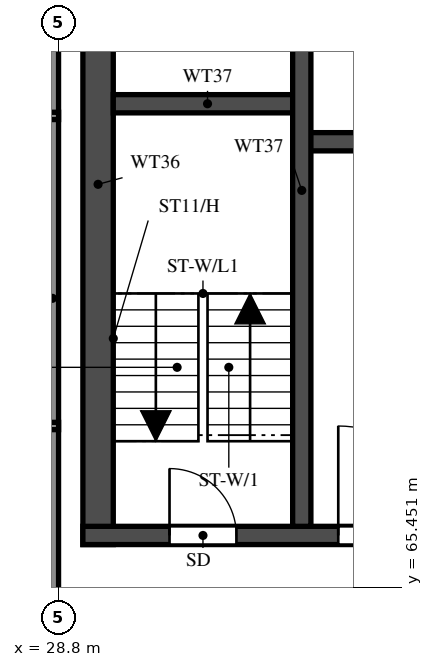
"""IFC4 building model, lengths in metres.
Left out: names, types, materials, properties, quantities, classifications, styles, units other than length and angle.
Written with IfcOpenShell. Run it as: python <this file> out.ifc"""

import sys

from ifc_helpers import new_model, si_unit, direction, frame, frame_2d, origin, place, context, subcontext, project, spatial, rectangle, extrude, element, fill, save


model = new_model("IFC4")
c1 = context("Model", 3, precision=1e-05, world=origin(), true_north=direction((0.0, 1.0)))
c2 = subcontext(c1, "Body", "Model", "MODEL_VIEW")
j1 = project(units=[si_unit("LENGTHUNIT", "METRE"), si_unit("PLANEANGLEUNIT", "RADIAN")], contexts=[c1])
p1 = place(None, origin())
s1 = spatial("IfcSite", under=j1, at=p1, CompositionType="ELEMENT")
p2 = place(p1, origin())
s2 = spatial("IfcBuilding", under=s1, at=p2, CompositionType="ELEMENT")
p3 = place(p2, frame((0.0, 0.0, 264.0)))
s3 = spatial("IfcBuildingStorey", under=s2, at=p3, CompositionType="ELEMENT", Elevation=264.0)
p4 = place(p3, frame((29.45, 66.15, 0.0), z_axis=(0.0, 0.0, 1.0), x_axis=(0.0, 1.0, 0.0)))
e1 = element("IfcWall", 1, at=p4, inside=s3, PredefinedType="SHEAR", context=c2, shape_type="SweptSolid", body=[
    extrude(rectangle(XDim=11.85, YDim=0.5, at=frame_2d((5.925, 0.0))), origin(), (0.0, 0.0, 1.0), 3.22),
])
p5 = place(p3, frame((29.2, 66.3, 0.0), z_axis=(0.0, 0.0, 1.0), x_axis=(1.0, 0.0, 0.0)))
e2 = element("IfcWall", 2, at=p5, inside=s3, PredefinedType="SHEAR", context=c2, shape_type="SweptSolid", body=[
    extrude(rectangle(XDim=42.4, YDim=0.3, at=frame_2d((21.2, 0.0))), origin(), (0.0, 0.0, 1.0), 3.22),
])
p6 = place(p5, frame((1.425, 0.0, 0.0)))
e3 = element("IfcOpeningElement", 3, at=p6, cuts=e2, PredefinedType="OPENING", context=c2, shape_type="SweptSolid", body=[
    extrude(rectangle(XDim=1.1, YDim=2.1, at=frame_2d((0.55, 1.05))), frame((0.0, 0.16, 0.0), z_axis=(0.0, -1.0, 0.0), x_axis=(1.0, 0.0, 0.0)), (0.0, 0.0, 1.0), 0.32),
])
p7 = place(p5, frame((4.2, 0.0, 0.0)))
e4 = element("IfcOpeningElement", 4, at=p7, cuts=e2, PredefinedType="OPENING", context=c2, shape_type="SweptSolid", body=[
    extrude(rectangle(XDim=1.8, YDim=2.1, at=frame_2d((0.9, 1.05))), frame((0.0, 0.16, 0.0), z_axis=(0.0, -1.0, 0.0), x_axis=(1.0, 0.0, 0.0)), (0.0, 0.0, 1.0), 0.32),
])
p8 = place(p3, frame((32.8, 72.775, 0.0), z_axis=(0.0, 0.0, 1.0), x_axis=(1.0, 0.0, 0.0)))
e5 = element("IfcWall", 5, at=p8, inside=s3, PredefinedType="SHEAR", context=c2, shape_type="SweptSolid", body=[
    extrude(rectangle(XDim=35.2, YDim=0.3, at=frame_2d((17.6, 0.0))), origin(), (0.0, 0.0, 1.0), 3.22),
])
p9 = place(p8, frame((19.8, 0.0, 0.0)))
e6 = element("IfcOpeningElement", 6, at=p9, cuts=e5, PredefinedType="OPENING", context=c2, shape_type="SweptSolid", body=[
    extrude(rectangle(XDim=1.1, YDim=2.1, at=frame_2d((0.55, 1.05))), frame((0.0, 0.16, 0.0), z_axis=(0.0, -1.0, 0.0), x_axis=(1.0, 0.0, 0.0)), (0.0, 0.0, 1.0), 0.32),
])
p10 = place(p8, frame((27.725, 0.0, 0.0)))
e7 = element("IfcOpeningElement", 7, at=p10, cuts=e5, PredefinedType="OPENING", context=c2, shape_type="SweptSolid", body=[
    extrude(rectangle(XDim=1.1, YDim=2.1, at=frame_2d((0.55, 1.05))), frame((0.0, 0.16, 0.0), z_axis=(0.0, -1.0, 0.0), x_axis=(1.0, 0.0, 0.0)), (0.0, 0.0, 1.0), 0.32),
])
p11 = place(p8, frame((30.325, 0.0, 0.0)))
e8 = element("IfcOpeningElement", 8, at=p11, cuts=e5, PredefinedType="OPENING", context=c2, shape_type="SweptSolid", body=[
    extrude(rectangle(XDim=1.1, YDim=2.1, at=frame_2d((0.55, 1.05))), frame((0.0, 0.16, 0.0), z_axis=(0.0, -1.0, 0.0), x_axis=(1.0, 0.0, 0.0)), (0.0, 0.0, 1.0), 0.32),
])
p12 = place(p8, frame((3.825, 0.0, 0.0)))
e9 = element("IfcOpeningElement", 9, at=p12, cuts=e5, PredefinedType="OPENING", context=c2, shape_type="SweptSolid", body=[
    extrude(rectangle(XDim=1.1, YDim=2.1, at=frame_2d((0.55, 1.05))), frame((0.0, 0.16, 0.0), z_axis=(0.0, -1.0, 0.0), x_axis=(1.0, 0.0, 0.0)), (0.0, 0.0, 1.0), 0.32),
])
p13 = place(p8, frame((6.575, 0.0, 0.0)))
e10 = element("IfcOpeningElement", 10, at=p13, cuts=e5, PredefinedType="OPENING", context=c2, shape_type="SweptSolid", body=[
    extrude(rectangle(XDim=1.1, YDim=2.1, at=frame_2d((0.55, 1.05))), frame((0.0, 0.16, 0.0), z_axis=(0.0, -1.0, 0.0), x_axis=(1.0, 0.0, 0.0)), (0.0, 0.0, 1.0), 0.32),
])
p14 = place(p8, frame((9.325, 0.0, 0.0)))
e11 = element("IfcOpeningElement", 11, at=p14, cuts=e5, PredefinedType="OPENING", context=c2, shape_type="SweptSolid", body=[
    extrude(rectangle(XDim=1.1, YDim=2.1, at=frame_2d((0.55, 1.05))), frame((0.0, 0.16, 0.0), z_axis=(0.0, -1.0, 0.0), x_axis=(1.0, 0.0, 0.0)), (0.0, 0.0, 1.0), 0.32),
])
p15 = place(p8, frame((12.075, 0.0, 0.0)))
e12 = element("IfcOpeningElement", 12, at=p15, cuts=e5, PredefinedType="OPENING", context=c2, shape_type="SweptSolid", body=[
    extrude(rectangle(XDim=1.1, YDim=2.1, at=frame_2d((0.55, 1.05))), frame((0.0, 0.16, 0.0), z_axis=(0.0, -1.0, 0.0), x_axis=(1.0, 0.0, 0.0)), (0.0, 0.0, 1.0), 0.32),
])
p16 = place(p8, frame((14.825, 0.0, 0.0)))
e13 = element("IfcOpeningElement", 13, at=p16, cuts=e5, PredefinedType="OPENING", context=c2, shape_type="SweptSolid", body=[
    extrude(rectangle(XDim=1.1, YDim=2.1, at=frame_2d((0.55, 1.05))), frame((0.0, 0.16, 0.0), z_axis=(0.0, -1.0, 0.0), x_axis=(1.0, 0.0, 0.0)), (0.0, 0.0, 1.0), 0.32),
])
p17 = place(p8, frame((17.575, 0.0, 0.0)))
e14 = element("IfcOpeningElement", 14, at=p17, cuts=e5, PredefinedType="OPENING", context=c2, shape_type="SweptSolid", body=[
    extrude(rectangle(XDim=1.1, YDim=2.1, at=frame_2d((0.55, 1.05))), frame((0.0, 0.16, 0.0), z_axis=(0.0, -1.0, 0.0), x_axis=(1.0, 0.0, 0.0)), (0.0, 0.0, 1.0), 0.32),
])
p18 = place(p8, frame((0.95, 0.0, 0.0)))
e15 = element("IfcOpeningElement", 15, at=p18, cuts=e5, PredefinedType="OPENING", context=c2, shape_type="SweptSolid", body=[
    extrude(rectangle(XDim=1.1, YDim=2.1, at=frame_2d((0.55, 1.05))), frame((0.0, 0.16, 0.0), z_axis=(0.0, -1.0, 0.0), x_axis=(1.0, 0.0, 0.0)), (0.0, 0.0, 1.0), 0.32),
])
p19 = place(p3, frame((29.7, 73.4, 0.0), z_axis=(0.0, 0.0, 1.0), x_axis=(1.0, 0.0, 0.0)))
e16 = element("IfcWall", 16, at=p19, inside=s3, PredefinedType="SHEAR", context=c2, shape_type="SweptSolid", body=[
    extrude(rectangle(XDim=3.1, YDim=0.3, at=frame_2d((1.55, 0.0))), origin(), (0.0, 0.0, 1.0), 3.22),
])
p20 = place(p3, frame((32.8, 66.45, 0.0), z_axis=(0.0, 0.0, 1.0), x_axis=(0.0, 1.0, 0.0)))
e17 = element("IfcWall", 17, at=p20, inside=s3, PredefinedType="SHEAR", context=c2, shape_type="SweptSolid", body=[
    extrude(rectangle(XDim=11.05, YDim=0.3, at=frame_2d((5.525, 0.0))), origin(), (0.0, 0.0, 1.0), 3.22),
])
p21 = place(p3, frame((28.7, 62.4, 0.0), z_axis=(0.0, 0.0, 1.0), x_axis=(0.0, 1.0, 0.0)))
e18 = element("IfcWall", 18, at=p21, inside=s3, PredefinedType="SOLIDWALL", context=c2, shape_type="SweptSolid", body=[
    extrude(rectangle(XDim=15.6, YDim=0.2, at=frame_2d((7.8, 0.0))), origin(), (0.0, 0.0, 1.0), 3.22),
])
p22 = place(p3, frame((25.3, 68.1, 0.0), z_axis=(0.0, 0.0, 1.0), x_axis=(1.0, 0.0, 0.0)))
e19 = element("IfcWall", 19, at=p22, inside=s3, PredefinedType="PARTITIONING", context=c2, shape_type="SweptSolid", body=[
    extrude(rectangle(XDim=3.5, YDim=0.12, at=frame_2d((1.75, 0.0))), origin(), (0.0, 0.0, 1.0), 3.22),
])
p23 = place(p3, frame((18.525, 73.2, 0.0), z_axis=(0.0, 0.0, 1.0), x_axis=(1.0, 0.0, 0.0)))
e20 = element("IfcWall", 20, at=p23, inside=s3, PredefinedType="PARTITIONING", context=c2, shape_type="SweptSolid", body=[
    extrude(rectangle(XDim=10.275, YDim=0.12, at=frame_2d((5.138, 0.0))), origin(), (0.0, 0.0, 1.0), 2.32),
])
p24 = place(p23, frame((5.275, 0.0, 0.0)))
e21 = element("IfcOpeningElement", 21, at=p24, cuts=e20, PredefinedType="OPENING", context=c2, shape_type="SweptSolid", body=[
    extrude(rectangle(XDim=0.9, YDim=2.1, at=frame_2d((0.45, 1.05))), frame((0.0, 0.07, 0.0), z_axis=(0.0, -1.0, 0.0), x_axis=(1.0, 0.0, 0.0)), (0.0, 0.0, 1.0), 0.14),
])
p25 = place(p6, origin())
e22 = element("IfcDoor", 22, at=p25, inside=s3, OperationType="SINGLE_SWING_LEFT", PredefinedType="DOOR", context=c2, shape_type="SweptSolid", body=[
    extrude(rectangle(XDim=1.1, YDim=2.1, at=frame_2d((0.55, 1.05))), frame((0.0, 0.025, 0.0), z_axis=(0.0, -1.0, 0.0), x_axis=(1.0, 0.0, 0.0)), (0.0, 0.0, 1.0), 0.05),
])
fill(e3, e22)
p26 = place(p7, origin())
e23 = element("IfcDoor", 23, at=p26, inside=s3, OperationType="DOUBLE_DOOR_SINGLE_SWING", PredefinedType="DOOR", context=c2, shape_type="SweptSolid", body=[
    extrude(rectangle(XDim=1.8, YDim=2.1, at=frame_2d((0.9, 1.05))), frame((0.0, 0.025, 0.0), z_axis=(0.0, -1.0, 0.0), x_axis=(1.0, 0.0, 0.0)), (0.0, 0.0, 1.0), 0.05),
])
fill(e4, e23)
save(model, sys.argv[1])
